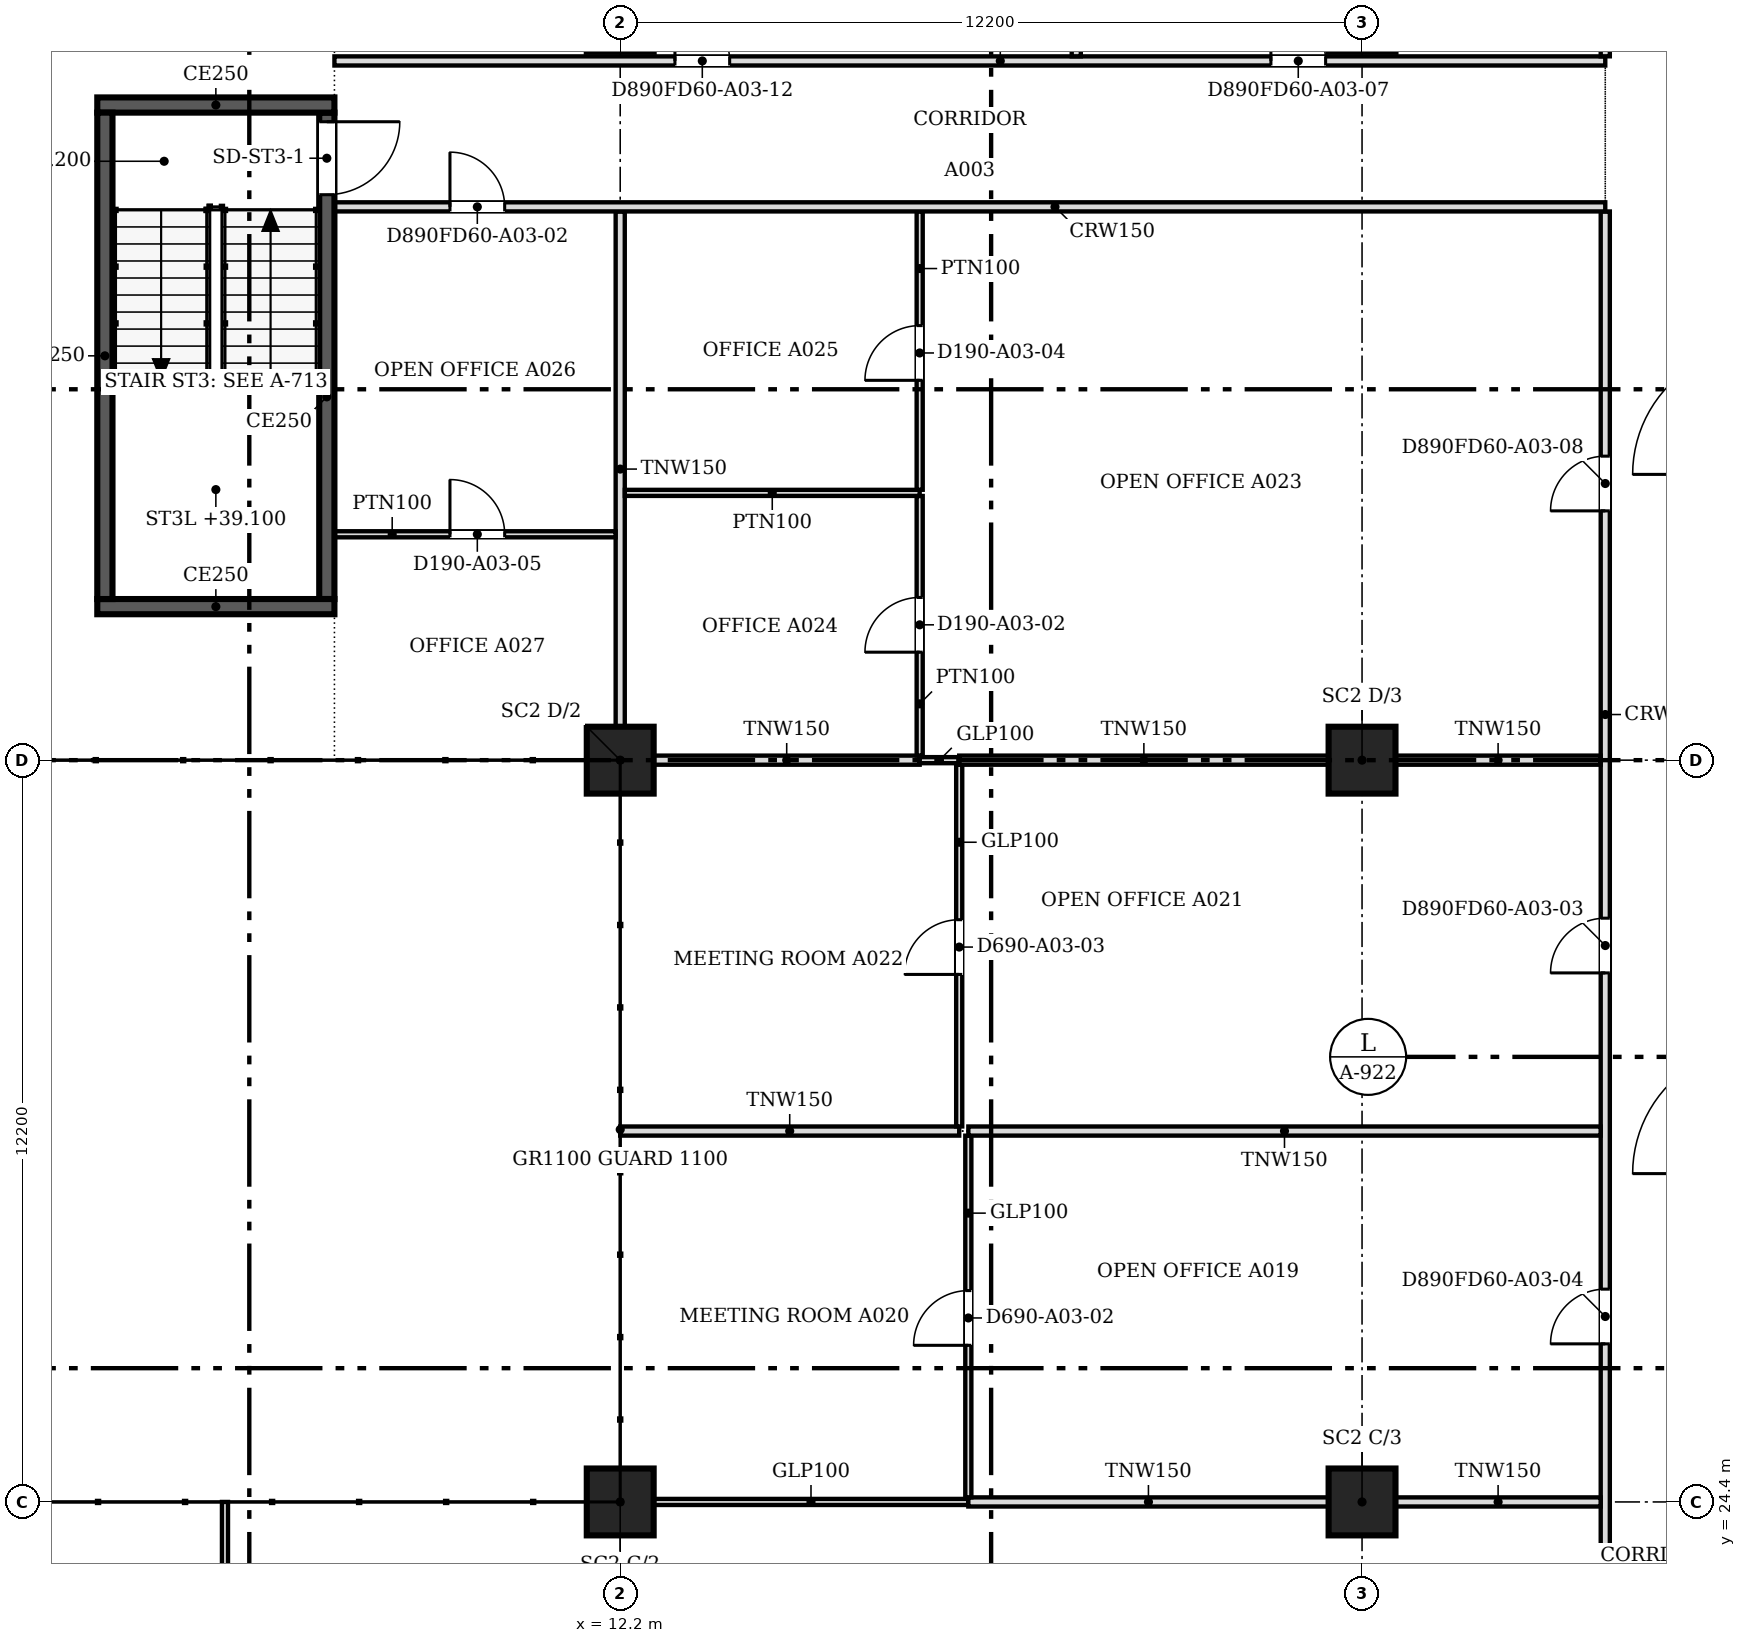
"""IFC4 building model, lengths in metres.
Left out: names, types, materials, properties, quantities, classifications, styles, units other than length and angle.
Written with IfcOpenShell. Run it as: python <this file> out.ifc"""

import sys

from ifc_helpers import new_model, si_unit, direction, frame, frame_2d, origin, origin_2d, place, context, subcontext, project, spatial, rectangle, extrude, source, transform, mapped, element, fill, save


model = new_model("IFC4")
c1 = context("Model", 3, precision=1e-05, world=origin(), true_north=direction((0.0, 1.0)))
c2 = subcontext(c1, "Body", "Model", "MODEL_VIEW")
j1 = project(units=[si_unit("LENGTHUNIT", "METRE"), si_unit("PLANEANGLEUNIT", "RADIAN")], contexts=[c1])
p1 = place(None, origin())
s1 = spatial("IfcSite", under=j1, at=p1, CompositionType="ELEMENT")
p2 = place(p1, origin())
s2 = spatial("IfcBuilding", under=s1, at=p2, CompositionType="ELEMENT")
p3 = place(p2, frame((0.0, 0.0, 37.2)))
s3 = spatial("IfcBuildingStorey", under=s2, at=p3, CompositionType="ELEMENT", Elevation=37.2)
for number, where, z_axis, x_axis in (
    (1, (12.2, 24.4, 0.0), (0.0, 0.0, 1.0), (1.0, 0.0, 0.0)),
    (2, (12.2, 36.6, 0.0), (0.0, 0.0, 1.0), (1.0, 0.0, 0.0)),
    (3, (24.4, 24.4, 0.0), (0.0, 0.0, 1.0), (1.0, 0.0, 0.0)),
    (4, (24.4, 36.6, 0.0), (0.0, 0.0, 1.0), (1.0, 0.0, 0.0)),
):
    element("IfcColumn", number, at=place(p3, frame(where, z_axis=z_axis, x_axis=x_axis)), inside=s3, PredefinedType="COLUMN", context=c2, shape_type="SweptSolid", body=[
        extrude(rectangle(XDim=1.1, YDim=1.1, at=origin_2d()), origin(), (0.0, 0.0, 1.0), 3.6),
    ])
p4 = place(p3, frame((7.5, 39.125, 0.0), z_axis=(0.0, 0.0, 1.0), x_axis=(-1.0, 0.0, 0.0)))
e5 = element("IfcWall", 5, at=p4, inside=s3, PredefinedType="SOLIDWALL", context=c2, shape_type="SweptSolid", body=[
    extrude(rectangle(XDim=3.9, YDim=0.25, at=frame_2d((1.95, 0.0))), origin(), (0.0, 0.0, 1.0), 3.8),
])
p5 = place(p3, frame((3.725, 39.25, 0.0), z_axis=(0.0, 0.0, 1.0), x_axis=(0.0, 1.0, 0.0)))
e6 = element("IfcWall", 6, at=p5, inside=s3, PredefinedType="SOLIDWALL", context=c2, shape_type="SweptSolid", body=[
    extrude(rectangle(XDim=8.0, YDim=0.25, at=frame_2d((4.0, 0.0))), origin(), (0.0, 0.0, 1.0), 3.8),
])
p6 = place(p3, frame((3.6, 47.375, 0.0), z_axis=(0.0, 0.0, 1.0), x_axis=(1.0, 0.0, 0.0)))
e7 = element("IfcWall", 7, at=p6, inside=s3, PredefinedType="SOLIDWALL", context=c2, shape_type="SweptSolid", body=[
    extrude(rectangle(XDim=3.9, YDim=0.25, at=frame_2d((1.95, 0.0))), origin(), (0.0, 0.0, 1.0), 3.8),
])
p7 = place(p3, frame((7.375, 47.25, 0.0), z_axis=(0.0, 0.0, 1.0), x_axis=(0.0, -1.0, 0.0)))
e8 = element("IfcWall", 8, at=p7, inside=s3, PredefinedType="SOLIDWALL", context=c2, shape_type="SweptSolid", body=[
    extrude(rectangle(XDim=8.0, YDim=0.25, at=frame_2d((4.0, 0.0))), origin(), (0.0, 0.0, 1.0), 3.8),
])
m1 = source(origin(), c2, "Body", "SweptSolid", [
    extrude(rectangle(XDim=1.2, YDim=2.1, at=frame_2d((0.6, 1.05))), frame((0.0, 0.135, 0.0), z_axis=(0.0, -1.0, 0.0), x_axis=(1.0, 0.0, 0.0)), (0.0, 0.0, 1.0), 0.27),
])
p8 = place(p7, frame((0.15, 0.0, 0.0)))
e9 = element("IfcOpeningElement", 9, at=p8, cuts=e8, PredefinedType="OPENING", context=c2, shape_type="MappedRepresentation", body=[
    mapped(m1, transform((0.0, 0.0, 0.0), scale=1.0)),
])
p9 = place(p3, frame((28.4, 18.8, 0.0), z_axis=(0.0, 0.0, 1.0), x_axis=(0.0, 1.0, 0.0)))
e10 = element("IfcWall", 10, at=p9, inside=s3, PredefinedType="PARTITIONING", context=c2, shape_type="SweptSolid", body=[
    extrude(rectangle(XDim=26.824, YDim=0.15, at=frame_2d((13.412, 0.0))), origin(), (0.0, 0.0, 1.0), 3.067),
])
m2 = source(origin(), c2, "Body", "SweptSolid", [
    extrude(rectangle(XDim=0.9, YDim=2.1, at=frame_2d((0.45, 1.05))), frame((0.0, 0.085, 0.0), z_axis=(0.0, -1.0, 0.0), x_axis=(1.0, 0.0, 0.0)), (0.0, 0.0, 1.0), 0.17),
])
p10 = place(p9, frame((1.3, 0.0, 0.0)))
e11 = element("IfcOpeningElement", 11, at=p10, cuts=e10, PredefinedType="OPENING", context=c2, shape_type="MappedRepresentation", body=[
    mapped(m2, transform((0.0, 0.0, 0.0), scale=1.0)),
])
p11 = place(p9, frame((14.301, 0.0, 0.0)))
e12 = element("IfcOpeningElement", 12, at=p11, cuts=e10, PredefinedType="OPENING", context=c2, shape_type="MappedRepresentation", body=[
    mapped(m2, transform((0.0, 0.0, 0.0), scale=1.0)),
])
p12 = place(p9, frame((8.2, 0.0, 0.0)))
e13 = element("IfcOpeningElement", 13, at=p12, cuts=e10, PredefinedType="OPENING", context=c2, shape_type="MappedRepresentation", body=[
    mapped(m2, transform((0.0, 0.0, 0.0), scale=1.0)),
])
p13 = place(p9, frame((21.9, 0.0, 0.0)))
e14 = element("IfcOpeningElement", 14, at=p13, cuts=e10, PredefinedType="OPENING", context=c2, shape_type="MappedRepresentation", body=[
    mapped(m2, transform((0.0, 0.0, 0.0), scale=1.0)),
])
p14 = place(p3, frame((5.7, 18.99, 0.0), z_axis=(0.0, 0.0, 1.0), x_axis=(0.0, 1.0, 0.0)))
e15 = element("IfcWall", 15, at=p14, inside=s3, PredefinedType="PARTITIONING", context=c2, shape_type="SweptSolid", body=[
    extrude(rectangle(XDim=5.41, YDim=0.1, at=frame_2d((2.705, 0.0))), origin(), (0.0, 0.0, 1.0), 3.067),
])
m3 = source(origin(), c2, "Body", "SweptSolid", [
    extrude(rectangle(XDim=0.9, YDim=2.1, at=frame_2d((0.45, 1.05))), frame((0.0, 0.06, 0.0), z_axis=(0.0, -1.0, 0.0), x_axis=(1.0, 0.0, 0.0)), (0.0, 0.0, 1.0), 0.12),
])
p15 = place(p14, frame((2.3, 0.0, 0.0)))
e16 = element("IfcOpeningElement", 16, at=p15, cuts=e15, PredefinedType="OPENING", context=c2, shape_type="MappedRepresentation", body=[
    mapped(m3, transform((0.0, 0.0, 0.0), scale=1.0)),
])
p16 = place(p3, frame((12.751, 24.4, 0.0), z_axis=(0.0, 0.0, 1.0), x_axis=(1.0, 0.0, 0.0)))
e17 = element("IfcWall", 17, at=p16, inside=s3, PredefinedType="PARTITIONING", context=c2, shape_type="SweptSolid", body=[
    extrude(rectangle(XDim=5.173, YDim=0.1, at=frame_2d((2.586, 0.0))), origin(), (0.0, 0.0, 1.0), 3.067),
])
p17 = place(p3, frame((17.925, 24.4, 0.0), z_axis=(0.0, 0.0, 1.0), x_axis=(1.0, 0.0, 0.0)))
e18 = element("IfcWall", 18, at=p17, inside=s3, PredefinedType="PARTITIONING", context=c2, shape_type="SweptSolid", body=[
    extrude(rectangle(XDim=5.924, YDim=0.15, at=frame_2d((2.962, 0.0))), origin(), (0.0, 0.0, 1.0), 3.067),
])
p18 = place(p3, frame((24.951, 24.4, 0.0), z_axis=(0.0, 0.0, 1.0), x_axis=(1.0, 0.0, 0.0)))
e19 = element("IfcWall", 19, at=p18, inside=s3, PredefinedType="PARTITIONING", context=c2, shape_type="SweptSolid", body=[
    extrude(rectangle(XDim=3.373, YDim=0.15, at=frame_2d((1.687, 0.0))), origin(), (0.0, 0.0, 1.0), 3.067),
])
p19 = place(p3, frame((17.925, 24.476, 0.0), z_axis=(0.0, 0.0, 1.0), x_axis=(0.0, 1.0, 0.0)))
e20 = element("IfcWall", 20, at=p19, inside=s3, PredefinedType="PARTITIONING", context=c2, shape_type="SweptSolid", body=[
    extrude(rectangle(XDim=5.948, YDim=0.1, at=frame_2d((2.974, 0.0))), origin(), (0.0, 0.0, 1.0), 3.067),
])
p20 = place(p19, frame((2.5, 0.0, 0.0)))
e21 = element("IfcOpeningElement", 21, at=p20, cuts=e20, PredefinedType="OPENING", context=c2, shape_type="MappedRepresentation", body=[
    mapped(m3, transform((0.0, 0.0, 0.0), scale=1.0)),
])
p21 = place(p3, frame((12.2, 30.5, 0.0), z_axis=(0.0, 0.0, 1.0), x_axis=(1.0, 0.0, 0.0)))
e22 = element("IfcWall", 22, at=p21, inside=s3, PredefinedType="PARTITIONING", context=c2, shape_type="SweptSolid", body=[
    extrude(rectangle(XDim=5.575, YDim=0.15, at=frame_2d((2.788, 0.0))), origin(), (0.0, 0.0, 1.0), 3.067),
])
p22 = place(p3, frame((17.925, 30.5, 0.0), z_axis=(0.0, 0.0, 1.0), x_axis=(1.0, 0.0, 0.0)))
e23 = element("IfcWall", 23, at=p22, inside=s3, PredefinedType="PARTITIONING", context=c2, shape_type="SweptSolid", body=[
    extrude(rectangle(XDim=10.399, YDim=0.15, at=frame_2d((5.199, 0.0))), origin(), (0.0, 0.0, 1.0), 3.067),
])
p23 = place(p3, frame((17.775, 30.576, 0.0), z_axis=(0.0, 0.0, 1.0), x_axis=(0.0, 1.0, 0.0)))
e24 = element("IfcWall", 24, at=p23, inside=s3, PredefinedType="PARTITIONING", context=c2, shape_type="SweptSolid", body=[
    extrude(rectangle(XDim=5.948, YDim=0.1, at=frame_2d((2.974, 0.0))), origin(), (0.0, 0.0, 1.0), 3.067),
])
p24 = place(p23, frame((2.5, 0.0, 0.0)))
e25 = element("IfcOpeningElement", 25, at=p24, cuts=e24, PredefinedType="OPENING", context=c2, shape_type="MappedRepresentation", body=[
    mapped(m3, transform((0.0, 0.0, 0.0), scale=1.0)),
])
p25 = place(p3, frame((12.751, 36.6, 0.0), z_axis=(0.0, 0.0, 1.0), x_axis=(1.0, 0.0, 0.0)))
e26 = element("IfcWall", 26, at=p25, inside=s3, PredefinedType="PARTITIONING", context=c2, shape_type="SweptSolid", body=[
    extrude(rectangle(XDim=4.374, YDim=0.15, at=frame_2d((2.187, 0.0))), origin(), (0.0, 0.0, 1.0), 3.067),
])
p26 = place(p3, frame((17.126, 36.6, 0.0), z_axis=(0.0, 0.0, 1.0), x_axis=(1.0, 0.0, 0.0)))
e27 = element("IfcWall", 27, at=p26, inside=s3, PredefinedType="PARTITIONING", context=c2, shape_type="SweptSolid", body=[
    extrude(rectangle(XDim=0.648, YDim=0.1, at=frame_2d((0.324, 0.0))), origin(), (0.0, 0.0, 1.0), 3.067),
])
p27 = place(p3, frame((17.775, 36.6, 0.0), z_axis=(0.0, 0.0, 1.0), x_axis=(1.0, 0.0, 0.0)))
e28 = element("IfcWall", 28, at=p27, inside=s3, PredefinedType="PARTITIONING", context=c2, shape_type="SweptSolid", body=[
    extrude(rectangle(XDim=6.074, YDim=0.15, at=frame_2d((3.037, 0.0))), origin(), (0.0, 0.0, 1.0), 3.067),
])
p28 = place(p3, frame((24.951, 36.6, 0.0), z_axis=(0.0, 0.0, 1.0), x_axis=(1.0, 0.0, 0.0)))
e29 = element("IfcWall", 29, at=p28, inside=s3, PredefinedType="PARTITIONING", context=c2, shape_type="SweptSolid", body=[
    extrude(rectangle(XDim=3.373, YDim=0.15, at=frame_2d((1.687, 0.0))), origin(), (0.0, 0.0, 1.0), 3.067),
])
p29 = place(p3, frame((17.125, 36.676, 0.0), z_axis=(0.0, 0.0, 1.0), x_axis=(0.0, 1.0, 0.0)))
e30 = element("IfcWall", 30, at=p29, inside=s3, PredefinedType="PARTITIONING", context=c2, shape_type="SweptSolid", body=[
    extrude(rectangle(XDim=4.269, YDim=0.1, at=frame_2d((2.135, 0.0))), origin(), (0.0, 0.0, 1.0), 3.067),
])
p30 = place(p29, frame((1.7, 0.0, 0.0)))
e31 = element("IfcOpeningElement", 31, at=p30, cuts=e30, PredefinedType="OPENING", context=c2, shape_type="MappedRepresentation", body=[
    mapped(m3, transform((0.0, 0.0, 0.0), scale=1.0)),
])
p31 = place(p3, frame((12.2, 37.151, 0.0), z_axis=(0.0, 0.0, 1.0), x_axis=(0.0, 1.0, 0.0)))
e32 = element("IfcWall", 32, at=p31, inside=s3, PredefinedType="PARTITIONING", context=c2, shape_type="SweptSolid", body=[
    extrude(rectangle(XDim=8.473, YDim=0.15, at=frame_2d((4.237, 0.0))), origin(), (0.0, 0.0, 1.0), 3.067),
])
p32 = place(p3, frame((12.124, 40.315, 0.0), z_axis=(0.0, 0.0, 1.0), x_axis=(-1.0, 0.0, 0.0)))
e33 = element("IfcWall", 33, at=p32, inside=s3, PredefinedType="PARTITIONING", context=c2, shape_type="SweptSolid", body=[
    extrude(rectangle(XDim=4.624, YDim=0.1, at=frame_2d((2.312, 0.0))), origin(), (0.0, 0.0, 1.0), 3.067),
])
p33 = place(p32, frame((1.824, 0.0, 0.0)))
e34 = element("IfcOpeningElement", 34, at=p33, cuts=e33, PredefinedType="OPENING", context=c2, shape_type="MappedRepresentation", body=[
    mapped(m3, transform((0.0, 0.0, 0.0), scale=1.0)),
])
p34 = place(p3, frame((12.276, 40.996, 0.0), z_axis=(0.0, 0.0, 1.0), x_axis=(1.0, 0.0, 0.0)))
e35 = element("IfcWall", 35, at=p34, inside=s3, PredefinedType="PARTITIONING", context=c2, shape_type="SweptSolid", body=[
    extrude(rectangle(XDim=4.849, YDim=0.1, at=frame_2d((2.425, 0.0))), origin(), (0.0, 0.0, 1.0), 3.067),
])
p35 = place(p3, frame((17.125, 41.047, 0.0), z_axis=(0.0, 0.0, 1.0), x_axis=(0.0, 1.0, 0.0)))
e36 = element("IfcWall", 36, at=p35, inside=s3, PredefinedType="PARTITIONING", context=c2, shape_type="SweptSolid", body=[
    extrude(rectangle(XDim=4.577, YDim=0.1, at=frame_2d((2.289, 0.0))), origin(), (0.0, 0.0, 1.0), 3.067),
])
p36 = place(p35, frame((1.8, 0.0, 0.0)))
e37 = element("IfcOpeningElement", 37, at=p36, cuts=e36, PredefinedType="OPENING", context=c2, shape_type="MappedRepresentation", body=[
    mapped(m3, transform((0.0, 0.0, 0.0), scale=1.0)),
])
p37 = place(p3, frame((28.4, 45.7, 0.0), z_axis=(0.0, 0.0, 1.0), x_axis=(-1.0, 0.0, 0.0)))
e38 = element("IfcWall", 38, at=p37, inside=s3, PredefinedType="PARTITIONING", context=c2, shape_type="SweptSolid", body=[
    extrude(rectangle(XDim=20.9, YDim=0.15, at=frame_2d((10.45, 0.0))), origin(), (0.0, 0.0, 1.0), 3.067),
])
p38 = place(p37, frame((18.1, 0.0, 0.0)))
e39 = element("IfcOpeningElement", 39, at=p38, cuts=e38, PredefinedType="OPENING", context=c2, shape_type="MappedRepresentation", body=[
    mapped(m2, transform((0.0, 0.0, 0.0), scale=1.0)),
])
p39 = place(p3, frame((7.5, 48.1, 0.0), z_axis=(0.0, 0.0, 1.0), x_axis=(1.0, 0.0, 0.0)))
e40 = element("IfcWall", 40, at=p39, inside=s3, PredefinedType="PARTITIONING", context=c2, shape_type="SweptSolid", body=[
    extrude(rectangle(XDim=20.9, YDim=0.15, at=frame_2d((10.45, 0.0))), origin(), (0.0, 0.0, 1.0), 3.067),
])
p40 = place(p39, frame((15.401, 0.0, 0.0)))
e41 = element("IfcOpeningElement", 41, at=p40, cuts=e40, PredefinedType="OPENING", context=c2, shape_type="MappedRepresentation", body=[
    mapped(m2, transform((0.0, 0.0, 0.0), scale=1.0)),
])
p41 = place(p39, frame((5.6, 0.0, 0.0)))
e42 = element("IfcOpeningElement", 42, at=p41, cuts=e40, PredefinedType="OPENING", context=c2, shape_type="MappedRepresentation", body=[
    mapped(m2, transform((0.0, 0.0, 0.0), scale=1.0)),
])
p42 = place(p3, frame((19.7, 48.176, 0.0), z_axis=(0.0, 0.0, 1.0), x_axis=(0.0, 1.0, 0.0)))
e43 = element("IfcWall", 43, at=p42, inside=s3, PredefinedType="PARTITIONING", context=c2, shape_type="SweptSolid", body=[
    extrude(rectangle(XDim=6.224, YDim=0.15, at=frame_2d((3.112, 0.0))), origin(), (0.0, 0.0, 1.0), 3.067),
])
p43 = place(p3, frame((28.4, 48.176, 0.0), z_axis=(0.0, 0.0, 1.0), x_axis=(0.0, 1.0, 0.0)))
e44 = element("IfcWall", 44, at=p43, inside=s3, PredefinedType="PARTITIONING", context=c2, shape_type="SweptSolid", body=[
    extrude(rectangle(XDim=2.648, YDim=0.15, at=frame_2d((1.324, 0.0))), origin(), (0.0, 0.0, 1.0), 3.067),
])
m4 = source(origin(), c2, "Body", "SweptSolid", [
    extrude(rectangle(XDim=1.2, YDim=2.1, at=frame_2d((0.6, 1.05))), frame((0.0, 0.025, 0.0), z_axis=(0.0, -1.0, 0.0), x_axis=(1.0, 0.0, 0.0)), (0.0, 0.0, 1.0), 0.05),
])
p44 = place(p8, origin())
e45 = element("IfcDoor", 45, at=p44, inside=s3, OperationType="SINGLE_SWING_LEFT", PredefinedType="DOOR", context=c2, shape_type="MappedRepresentation", body=[
    mapped(m4, transform((0.0, 0.0, 0.0), scale=1.0)),
])
fill(e9, e45)
m5 = source(origin(), c2, "Body", "SweptSolid", [
    extrude(rectangle(XDim=0.9, YDim=2.1, at=frame_2d((0.45, 1.05))), frame((0.0, 0.025, 0.0), z_axis=(0.0, -1.0, 0.0), x_axis=(1.0, 0.0, 0.0)), (0.0, 0.0, 1.0), 0.05),
])
p45 = place(p30, origin())
e46 = element("IfcDoor", 46, at=p45, inside=s3, OperationType="SINGLE_SWING_LEFT", PredefinedType="DOOR", context=c2, shape_type="MappedRepresentation", body=[
    mapped(m5, transform((0.0, 0.0, 0.0), scale=1.0)),
])
fill(e31, e46)
p46 = place(p36, origin())
e47 = element("IfcDoor", 47, at=p46, inside=s3, OperationType="SINGLE_SWING_LEFT", PredefinedType="DOOR", context=c2, shape_type="MappedRepresentation", body=[
    mapped(m5, transform((0.0, 0.0, 0.0), scale=1.0)),
])
fill(e37, e47)
p47 = place(p33, origin())
e48 = element("IfcDoor", 48, at=p47, inside=s3, OperationType="SINGLE_SWING_RIGHT", PredefinedType="DOOR", context=c2, shape_type="MappedRepresentation", body=[
    mapped(m5, transform((0.0, 0.0, 0.0), scale=1.0)),
])
fill(e34, e48)
p48 = place(p38, origin())
e49 = element("IfcDoor", 49, at=p48, inside=s3, OperationType="SINGLE_SWING_RIGHT", PredefinedType="DOOR", context=c2, shape_type="MappedRepresentation", body=[
    mapped(m5, transform((0.0, 0.0, 0.0), scale=1.0)),
])
fill(e39, e49)
p49 = place(p20, origin())
e50 = element("IfcDoor", 50, at=p49, inside=s3, OperationType="SINGLE_SWING_LEFT", PredefinedType="DOOR", context=c2, shape_type="MappedRepresentation", body=[
    mapped(m5, transform((0.0, 0.0, 0.0), scale=1.0)),
])
fill(e21, e50)
p50 = place(p24, origin())
e51 = element("IfcDoor", 51, at=p50, inside=s3, OperationType="SINGLE_SWING_LEFT", PredefinedType="DOOR", context=c2, shape_type="MappedRepresentation", body=[
    mapped(m5, transform((0.0, 0.0, 0.0), scale=1.0)),
])
fill(e25, e51)
p51 = place(p11, origin())
e52 = element("IfcDoor", 52, at=p51, inside=s3, OperationType="SINGLE_SWING_LEFT", PredefinedType="DOOR", context=c2, shape_type="MappedRepresentation", body=[
    mapped(m5, transform((0.0, 0.0, 0.0), scale=1.0)),
])
fill(e12, e52)
p52 = place(p12, origin())
e53 = element("IfcDoor", 53, at=p52, inside=s3, OperationType="SINGLE_SWING_LEFT", PredefinedType="DOOR", context=c2, shape_type="MappedRepresentation", body=[
    mapped(m5, transform((0.0, 0.0, 0.0), scale=1.0)),
])
fill(e13, e53)
p53 = place(p40, origin())
e54 = element("IfcDoor", 54, at=p53, inside=s3, OperationType="SINGLE_SWING_LEFT", PredefinedType="DOOR", context=c2, shape_type="MappedRepresentation", body=[
    mapped(m5, transform((0.0, 0.0, 0.0), scale=1.0)),
])
fill(e41, e54)
p54 = place(p13, origin())
e55 = element("IfcDoor", 55, at=p54, inside=s3, OperationType="SINGLE_SWING_LEFT", PredefinedType="DOOR", context=c2, shape_type="MappedRepresentation", body=[
    mapped(m5, transform((0.0, 0.0, 0.0), scale=1.0)),
])
fill(e14, e55)
p55 = place(p41, origin())
e56 = element("IfcDoor", 56, at=p55, inside=s3, OperationType="SINGLE_SWING_LEFT", PredefinedType="DOOR", context=c2, shape_type="MappedRepresentation", body=[
    mapped(m5, transform((0.0, 0.0, 0.0), scale=1.0)),
])
fill(e42, e56)
save(model, sys.argv[1])
